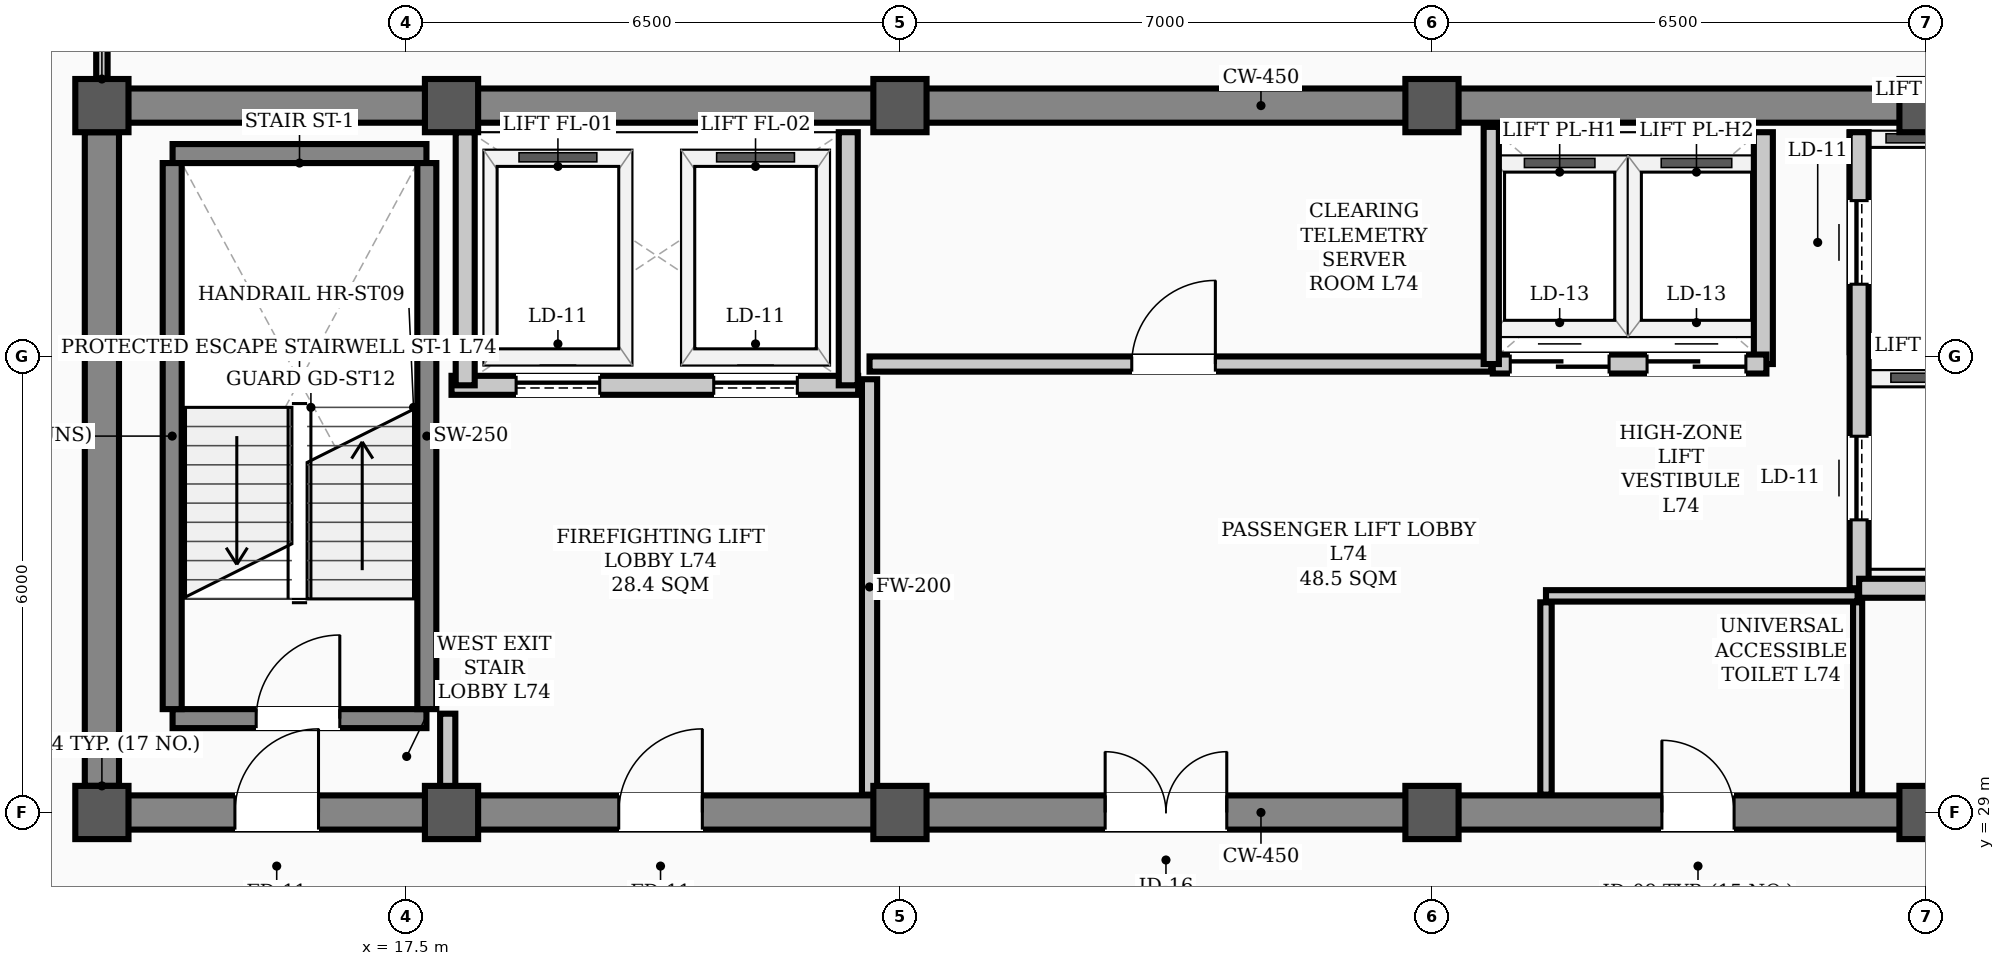
"""IFC4 building model, lengths in metres.
Left out: names, types, materials, properties, quantities, classifications, styles, units other than length and angle.
Written with IfcOpenShell. Run it as: python <this file> out.ifc"""

import sys

from ifc_helpers import new_model, si_unit, direction, frame, frame_2d, origin, origin_2d, place, context, subcontext, project, spatial, rectangle, hollow_rectangle, extrude, element, fill, save


model = new_model("IFC4")
c1 = context("Model", 3, precision=1e-05, world=origin(), true_north=direction((0.0, 1.0)))
c2 = subcontext(c1, "Body", "Model", "MODEL_VIEW")
j1 = project(units=[si_unit("LENGTHUNIT", "METRE"), si_unit("PLANEANGLEUNIT", "RADIAN")], contexts=[c1])
p1 = place(None, origin())
s1 = spatial("IfcSite", under=j1, at=p1, CompositionType="ELEMENT")
p2 = place(p1, origin())
s2 = spatial("IfcBuilding", under=s1, at=p2, CompositionType="ELEMENT")
p3 = place(p2, frame((0.0, 0.0, 296.9)))
s3 = spatial("IfcBuildingStorey", under=s2, at=p3, CompositionType="ELEMENT", Elevation=296.9)
for number, where, z_axis, x_axis in (
    (1, (13.5, 29.0, 0.0), (0.0, 0.0, 1.0), (1.0, 0.0, 0.0)),
    (2, (13.5, 38.3, 0.0), (0.0, 0.0, 1.0), (1.0, 0.0, 0.0)),
    (3, (18.1, 29.0, 0.0), (0.0, 0.0, 1.0), (1.0, 0.0, 0.0)),
    (4, (18.1, 38.3, 0.0), (0.0, 0.0, 1.0), (1.0, 0.0, 0.0)),
    (5, (24.0, 29.0, 0.0), (0.0, 0.0, 1.0), (1.0, 0.0, 0.0)),
    (6, (24.0, 38.3, 0.0), (0.0, 0.0, 1.0), (1.0, 0.0, 0.0)),
    (7, (31.0, 29.0, 0.0), (0.0, 0.0, 1.0), (1.0, 0.0, 0.0)),
    (8, (31.0, 38.3, 0.0), (0.0, 0.0, 1.0), (1.0, 0.0, 0.0)),
    (9, (37.5, 29.0, 0.0), (0.0, 0.0, 1.0), (1.0, 0.0, 0.0)),
    (10, (37.5, 38.3, 0.0), (0.0, 0.0, 1.0), (1.0, 0.0, 0.0)),
):
    element("IfcColumn", number, at=place(p3, frame(where, z_axis=z_axis, x_axis=x_axis)), inside=s3, PredefinedType="COLUMN", context=c2, shape_type="SweptSolid", body=[
        extrude(hollow_rectangle(XDim=0.7, YDim=0.7, WallThickness=0.028, InnerFilletRadius=0.014, OuterFilletRadius=0.042, at=origin_2d()), origin(), (0.0, 0.0, 1.0), 3.9),
    ])
p4 = place(p3, frame((13.5, 29.0, 0.0), z_axis=(0.0, 0.0, 1.0), x_axis=(1.0, 0.0, 0.0)))
e11 = element("IfcWall", 11, at=p4, inside=s3, PredefinedType="SHEAR", context=c2, shape_type="SweptSolid", body=[
    extrude(rectangle(XDim=30.5, YDim=0.45, at=frame_2d((15.25, 0.0))), origin(), (0.0, 0.0, 1.0), 3.72),
])
p5 = place(p4, frame((1.75, 0.0, 0.0)))
e12 = element("IfcOpeningElement", 12, at=p5, cuts=e11, PredefinedType="OPENING", context=c2, shape_type="SweptSolid", body=[
    extrude(rectangle(XDim=1.1, YDim=2.08, at=frame_2d((0.55, 1.04))), frame((0.0, 0.235, 0.0), z_axis=(0.0, -1.0, 0.0), x_axis=(1.0, 0.0, 0.0)), (0.0, 0.0, 1.0), 0.47),
])
p6 = place(p4, frame((26.7, 0.0, 0.0)))
e13 = element("IfcOpeningElement", 13, at=p6, cuts=e11, PredefinedType="OPENING", context=c2, shape_type="SweptSolid", body=[
    extrude(rectangle(XDim=1.1, YDim=2.08, at=frame_2d((0.55, 1.04))), frame((0.0, 0.235, 0.0), z_axis=(0.0, -1.0, 0.0), x_axis=(1.0, 0.0, 0.0)), (0.0, 0.0, 1.0), 0.47),
])
p7 = place(p4, frame((6.8, 0.0, 0.0)))
e14 = element("IfcOpeningElement", 14, at=p7, cuts=e11, PredefinedType="OPENING", context=c2, shape_type="SweptSolid", body=[
    extrude(rectangle(XDim=1.1, YDim=2.08, at=frame_2d((0.55, 1.04))), frame((0.0, 0.235, 0.0), z_axis=(0.0, -1.0, 0.0), x_axis=(1.0, 0.0, 0.0)), (0.0, 0.0, 1.0), 0.47),
])
p8 = place(p4, frame((13.2, 0.0, 0.0)))
e15 = element("IfcOpeningElement", 15, at=p8, cuts=e11, PredefinedType="OPENING", context=c2, shape_type="SweptSolid", body=[
    extrude(rectangle(XDim=1.6, YDim=2.08, at=frame_2d((0.8, 1.04))), frame((0.0, 0.235, 0.0), z_axis=(0.0, -1.0, 0.0), x_axis=(1.0, 0.0, 0.0)), (0.0, 0.0, 1.0), 0.47),
])
p9 = place(p4, frame((20.525, 0.0, 0.0)))
e16 = element("IfcOpeningElement", 16, at=p9, cuts=e11, PredefinedType="OPENING", context=c2, shape_type="SweptSolid", body=[
    extrude(rectangle(XDim=0.95, YDim=2.08, at=frame_2d((0.475, 1.04))), frame((0.0, 0.235, 0.0), z_axis=(0.0, -1.0, 0.0), x_axis=(1.0, 0.0, 0.0)), (0.0, 0.0, 1.0), 0.47),
])
p10 = place(p3, frame((13.5, 38.3, 0.0), z_axis=(0.0, 0.0, 1.0), x_axis=(1.0, 0.0, 0.0)))
e17 = element("IfcWall", 17, at=p10, inside=s3, PredefinedType="SHEAR", context=c2, shape_type="SweptSolid", body=[
    extrude(rectangle(XDim=30.5, YDim=0.45, at=frame_2d((15.25, 0.0))), origin(), (0.0, 0.0, 1.0), 3.72),
])
p11 = place(p3, frame((13.5, 29.35, 0.0), z_axis=(0.0, 0.0, 1.0), x_axis=(0.0, 1.0, 0.0)))
e18 = element("IfcWall", 18, at=p11, inside=s3, PredefinedType="SHEAR", context=c2, shape_type="SweptSolid", body=[
    extrude(rectangle(XDim=8.6, YDim=0.45, at=frame_2d((4.3, 0.0))), origin(), (0.0, 0.0, 1.0), 3.72),
])
p12 = place(p3, frame((14.43, 30.235, 0.0), z_axis=(0.0, 0.0, 1.0), x_axis=(1.0, 0.0, 0.0)))
e19 = element("IfcWall", 19, at=p12, inside=s3, PredefinedType="STANDARD", context=c2, shape_type="SweptSolid", body=[
    extrude(rectangle(XDim=3.34, YDim=0.25, at=frame_2d((1.67, 0.0))), origin(), (0.0, 0.0, 1.0), 3.72),
])
p13 = place(p12, frame((1.1, 0.0, 0.0)))
e20 = element("IfcOpeningElement", 20, at=p13, cuts=e19, PredefinedType="OPENING", context=c2, shape_type="SweptSolid", body=[
    extrude(rectangle(XDim=1.1, YDim=2.08, at=frame_2d((0.55, 1.04))), frame((0.0, 0.135, 0.0), z_axis=(0.0, -1.0, 0.0), x_axis=(1.0, 0.0, 0.0)), (0.0, 0.0, 1.0), 0.27),
])
p14 = place(p3, frame((14.43, 37.669, 0.0), z_axis=(0.0, 0.0, 1.0), x_axis=(1.0, 0.0, 0.0)))
e21 = element("IfcWall", 21, at=p14, inside=s3, PredefinedType="STANDARD", context=c2, shape_type="SweptSolid", body=[
    extrude(rectangle(XDim=3.34, YDim=0.25, at=frame_2d((1.67, 0.0))), origin(), (0.0, 0.0, 1.0), 3.72),
])
for number, where, z_axis, x_axis in (
    (22, (14.425, 30.36, 0.0), (0.0, 0.0, 1.0), (0.0, 1.0, 0.0)),
    (23, (17.775, 30.36, 0.0), (0.0, 0.0, 1.0), (0.0, 1.0, 0.0)),
):
    element("IfcWall", number, at=place(p3, frame(where, z_axis=z_axis, x_axis=x_axis)), inside=s3, PredefinedType="STANDARD", context=c2, shape_type="SweptSolid", body=[
        extrude(rectangle(XDim=7.184, YDim=0.25, at=frame_2d((3.592, 0.0))), origin(), (0.0, 0.0, 1.0), 3.72),
    ])
p15 = place(p3, frame((18.1, 34.62, 0.0), z_axis=(0.0, 0.0, 1.0), x_axis=(1.0, 0.0, 0.0)))
e24 = element("IfcWall", 24, at=p15, inside=s3, PredefinedType="STANDARD", context=c2, shape_type="SweptSolid", body=[
    extrude(rectangle(XDim=5.35, YDim=0.25, at=frame_2d((2.675, 0.0))), origin(), (0.0, 0.0, 1.0), 3.72),
])
p16 = place(p15, frame((0.85, 0.0, 0.0)))
e25 = element("IfcOpeningElement", 25, at=p16, cuts=e24, PredefinedType="OPENING", context=c2, shape_type="SweptSolid", body=[
    extrude(rectangle(XDim=1.1, YDim=2.08, at=frame_2d((0.55, 1.04))), frame((0.0, 0.135, 0.0), z_axis=(0.0, -1.0, 0.0), x_axis=(1.0, 0.0, 0.0)), (0.0, 0.0, 1.0), 0.27),
])
p17 = place(p15, frame((3.45, 0.0, 0.0)))
e26 = element("IfcOpeningElement", 26, at=p17, cuts=e24, PredefinedType="OPENING", context=c2, shape_type="SweptSolid", body=[
    extrude(rectangle(XDim=1.1, YDim=2.08, at=frame_2d((0.55, 1.04))), frame((0.0, 0.135, 0.0), z_axis=(0.0, -1.0, 0.0), x_axis=(1.0, 0.0, 0.0)), (0.0, 0.0, 1.0), 0.27),
])
p18 = place(p3, frame((36.62, 31.95, 0.0), z_axis=(0.0, 0.0, 1.0), x_axis=(0.0, 1.0, 0.0)))
e27 = element("IfcWall", 27, at=p18, inside=s3, PredefinedType="STANDARD", context=c2, shape_type="SweptSolid", body=[
    extrude(rectangle(XDim=6.0, YDim=0.25, at=frame_2d((3.0, 0.0))), origin(), (0.0, 0.0, 1.0), 3.4),
])
p19 = place(p18, frame((0.9, 0.0, 0.0)))
e28 = element("IfcOpeningElement", 28, at=p19, cuts=e27, PredefinedType="OPENING", context=c2, shape_type="SweptSolid", body=[
    extrude(rectangle(XDim=1.1, YDim=2.08, at=frame_2d((0.55, 1.04))), frame((0.0, 0.135, 0.0), z_axis=(0.0, -1.0, 0.0), x_axis=(1.0, 0.0, 0.0)), (0.0, 0.0, 1.0), 0.27),
])
p20 = place(p18, frame((4.0, 0.0, 0.0)))
e29 = element("IfcOpeningElement", 29, at=p20, cuts=e27, PredefinedType="OPENING", context=c2, shape_type="SweptSolid", body=[
    extrude(rectangle(XDim=1.1, YDim=2.08, at=frame_2d((0.55, 1.04))), frame((0.0, 0.135, 0.0), z_axis=(0.0, -1.0, 0.0), x_axis=(1.0, 0.0, 0.0)), (0.0, 0.0, 1.0), 0.27),
])
p21 = place(p3, frame((36.62, 31.95, 0.0), z_axis=(0.0, 0.0, 1.0), x_axis=(1.0, 0.0, 0.0)))
e30 = element("IfcWall", 30, at=p21, inside=s3, PredefinedType="STANDARD", context=c2, shape_type="SweptSolid", body=[
    extrude(rectangle(XDim=1.9, YDim=0.25, at=frame_2d((0.95, 0.0))), origin(), (0.0, 0.0, 1.0), 3.48),
])
for number, where, z_axis, x_axis in (
    (31, (18.28, 34.62, 0.0), (0.0, 0.0, 1.0), (0.0, 1.0, 0.0)),
    (32, (23.32, 34.62, 0.0), (0.0, 0.0, 1.0), (0.0, 1.0, 0.0)),
):
    element("IfcWall", number, at=place(p3, frame(where, z_axis=z_axis, x_axis=x_axis)), inside=s3, PredefinedType="STANDARD", context=c2, shape_type="SweptSolid", body=[
        extrude(rectangle(XDim=3.33, YDim=0.25, at=frame_2d((1.665, 0.0))), origin(), (0.0, 0.0, 1.0), 3.72),
    ])
p22 = place(p3, frame((35.36, 34.9, 0.0), z_axis=(0.0, 0.0, 1.0), x_axis=(0.0, 1.0, 0.0)))
e33 = element("IfcWall", 33, at=p22, inside=s3, PredefinedType="STANDARD", context=c2, shape_type="SweptSolid", body=[
    extrude(rectangle(XDim=3.05, YDim=0.25, at=frame_2d((1.525, 0.0))), origin(), (0.0, 0.0, 1.0), 3.4),
])
p23 = place(p3, frame((31.8, 34.9, 0.0), z_axis=(0.0, 0.0, 1.0), x_axis=(1.0, 0.0, 0.0)))
e34 = element("IfcWall", 34, at=p23, inside=s3, PredefinedType="STANDARD", context=c2, shape_type="SweptSolid", body=[
    extrude(rectangle(XDim=3.6, YDim=0.25, at=frame_2d((1.8, 0.0))), origin(), (0.0, 0.0, 1.0), 3.72),
])
p24 = place(p23, frame((0.23, 0.0, 0.0)))
e35 = element("IfcOpeningElement", 35, at=p24, cuts=e34, PredefinedType="OPENING", context=c2, shape_type="SweptSolid", body=[
    extrude(rectangle(XDim=1.3, YDim=2.08, at=frame_2d((0.65, 1.04))), frame((0.0, 0.135, 0.0), z_axis=(0.0, -1.0, 0.0), x_axis=(1.0, 0.0, 0.0)), (0.0, 0.0, 1.0), 0.27),
])
p25 = place(p23, frame((2.03, 0.0, 0.0)))
e36 = element("IfcOpeningElement", 36, at=p25, cuts=e34, PredefinedType="OPENING", context=c2, shape_type="SweptSolid", body=[
    extrude(rectangle(XDim=1.3, YDim=2.08, at=frame_2d((0.65, 1.04))), frame((0.0, 0.135, 0.0), z_axis=(0.0, -1.0, 0.0), x_axis=(1.0, 0.0, 0.0)), (0.0, 0.0, 1.0), 0.27),
])
p26 = place(p3, frame((23.6, 34.9, 0.0), z_axis=(0.0, 0.0, 1.0), x_axis=(1.0, 0.0, 0.0)))
e37 = element("IfcWall", 37, at=p26, inside=s3, PredefinedType="STANDARD", context=c2, shape_type="SweptSolid", body=[
    extrude(rectangle(XDim=8.18, YDim=0.2, at=frame_2d((4.09, 0.0))), origin(), (0.0, 0.0, 1.0), 3.72),
])
p27 = place(p26, frame((3.45, 0.0, 0.0)))
e38 = element("IfcOpeningElement", 38, at=p27, cuts=e37, PredefinedType="OPENING", context=c2, shape_type="SweptSolid", body=[
    extrude(rectangle(XDim=1.1, YDim=2.08, at=frame_2d((0.55, 1.04))), frame((0.0, 0.11, 0.0), z_axis=(0.0, -1.0, 0.0), x_axis=(1.0, 0.0, 0.0)), (0.0, 0.0, 1.0), 0.22),
])
p28 = place(p3, frame((32.5, 31.85, 0.0), z_axis=(0.0, 0.0, 1.0), x_axis=(1.0, 0.0, 0.0)))
e39 = element("IfcWall", 39, at=p28, inside=s3, PredefinedType="PARTITIONING", context=c2, shape_type="SweptSolid", body=[
    extrude(rectangle(XDim=4.1, YDim=0.15, at=frame_2d((2.05, 0.0))), origin(), (0.0, 0.0, 1.0), 3.72),
])
p29 = place(p3, frame((18.05, 29.235, 0.0), z_axis=(0.0, 0.0, 1.0), x_axis=(0.0, 1.0, 0.0)))
e40 = element("IfcWall", 40, at=p29, inside=s3, PredefinedType="STANDARD", context=c2, shape_type="SweptSolid", body=[
    extrude(rectangle(XDim=1.065, YDim=0.2, at=frame_2d((0.532, 0.0))), origin(), (0.0, 0.0, 1.0), 3.72),
])
p30 = place(p3, frame((23.6, 29.235, 0.0), z_axis=(0.0, 0.0, 1.0), x_axis=(0.0, 1.0, 0.0)))
e41 = element("IfcWall", 41, at=p30, inside=s3, PredefinedType="STANDARD", context=c2, shape_type="SweptSolid", body=[
    extrude(rectangle(XDim=5.465, YDim=0.2, at=frame_2d((2.732, 0.0))), origin(), (0.0, 0.0, 1.0), 3.2),
])
p31 = place(p3, frame((32.5, 29.235, 0.0), z_axis=(0.0, 0.0, 1.0), x_axis=(0.0, 1.0, 0.0)))
e42 = element("IfcWall", 42, at=p31, inside=s3, PredefinedType="PARTITIONING", context=c2, shape_type="SweptSolid", body=[
    extrude(rectangle(XDim=2.53, YDim=0.15, at=frame_2d((1.265, 0.0))), origin(), (0.0, 0.0, 1.0), 3.4),
])
p32 = place(p3, frame((36.6, 29.235, 0.0), z_axis=(0.0, 0.0, 1.0), x_axis=(0.0, 1.0, 0.0)))
e43 = element("IfcWall", 43, at=p32, inside=s3, PredefinedType="PARTITIONING", context=c2, shape_type="SweptSolid", body=[
    extrude(rectangle(XDim=2.53, YDim=0.12, at=frame_2d((1.265, 0.0))), origin(), (0.0, 0.0, 1.0), 3.4),
])
p33 = place(p3, frame((13.5, 38.535, 0.0), z_axis=(0.0, 0.0, 1.0), x_axis=(0.0, 1.0, 0.0)))
e44 = element("IfcWall", 44, at=p33, inside=s3, PredefinedType="PARTITIONING", context=c2, shape_type="SweptSolid", body=[
    extrude(rectangle(XDim=2.405, YDim=0.15, at=frame_2d((1.203, 0.0))), origin(), (0.0, 0.0, 1.0), 3.72),
])
p34 = place(p3, frame((31.78, 34.9, 0.0), z_axis=(0.0, 0.0, 1.0), x_axis=(0.0, 1.0, 0.0)))
e45 = element("IfcWall", 45, at=p34, inside=s3, PredefinedType="STANDARD", context=c2, shape_type="SweptSolid", body=[
    extrude(rectangle(XDim=3.12, YDim=0.2, at=frame_2d((1.56, 0.0))), origin(), (0.0, 0.0, 1.0), 3.4),
])
p35 = place(p13, origin())
e46 = element("IfcDoor", 46, at=p35, inside=s3, OperationType="SINGLE_SWING_RIGHT", PredefinedType="DOOR", context=c2, shape_type="SweptSolid", body=[
    extrude(rectangle(XDim=1.1, YDim=2.08, at=frame_2d((0.55, 1.04))), frame((0.0, 0.025, 0.0), z_axis=(0.0, -1.0, 0.0), x_axis=(1.0, 0.0, 0.0)), (0.0, 0.0, 1.0), 0.05),
])
fill(e20, e46)
p36 = place(p5, origin())
e47 = element("IfcDoor", 47, at=p36, inside=s3, OperationType="SINGLE_SWING_RIGHT", PredefinedType="DOOR", context=c2, shape_type="SweptSolid", body=[
    extrude(rectangle(XDim=1.1, YDim=2.08, at=frame_2d((0.55, 1.04))), frame((0.0, 0.025, 0.0), z_axis=(0.0, -1.0, 0.0), x_axis=(1.0, 0.0, 0.0)), (0.0, 0.0, 1.0), 0.05),
])
fill(e12, e47)
p37 = place(p7, origin())
e48 = element("IfcDoor", 48, at=p37, inside=s3, OperationType="SINGLE_SWING_RIGHT", PredefinedType="DOOR", context=c2, shape_type="SweptSolid", body=[
    extrude(rectangle(XDim=1.1, YDim=2.08, at=frame_2d((0.55, 1.04))), frame((0.0, 0.025, 0.0), z_axis=(0.0, -1.0, 0.0), x_axis=(1.0, 0.0, 0.0)), (0.0, 0.0, 1.0), 0.05),
])
fill(e14, e48)
p38 = place(p8, origin())
e49 = element("IfcDoor", 49, at=p38, inside=s3, OperationType="DOUBLE_DOOR_SINGLE_SWING", PredefinedType="DOOR", context=c2, shape_type="SweptSolid", body=[
    extrude(rectangle(XDim=1.6, YDim=2.08, at=frame_2d((0.8, 1.04))), frame((0.0, 0.025, 0.0), z_axis=(0.0, -1.0, 0.0), x_axis=(1.0, 0.0, 0.0)), (0.0, 0.0, 1.0), 0.05),
])
fill(e15, e49)
p39 = place(p27, origin())
e50 = element("IfcDoor", 50, at=p39, inside=s3, OperationType="SINGLE_SWING_RIGHT", PredefinedType="DOOR", context=c2, shape_type="SweptSolid", body=[
    extrude(rectangle(XDim=1.1, YDim=2.08, at=frame_2d((0.55, 1.04))), frame((0.0, 0.025, 0.0), z_axis=(0.0, -1.0, 0.0), x_axis=(1.0, 0.0, 0.0)), (0.0, 0.0, 1.0), 0.05),
])
fill(e38, e50)
p40 = place(p9, origin())
e51 = element("IfcDoor", 51, at=p40, inside=s3, OperationType="SINGLE_SWING_LEFT", PredefinedType="DOOR", context=c2, shape_type="SweptSolid", body=[
    extrude(rectangle(XDim=0.95, YDim=2.08, at=frame_2d((0.475, 1.04))), frame((0.0, 0.025, 0.0), z_axis=(0.0, -1.0, 0.0), x_axis=(1.0, 0.0, 0.0)), (0.0, 0.0, 1.0), 0.05),
])
fill(e16, e51)
p41 = place(p16, origin())
e52 = element("IfcDoor", 52, at=p41, inside=s3, OperationType="SLIDING_TO_LEFT", PredefinedType="DOOR", context=c2, shape_type="SweptSolid", body=[
    extrude(rectangle(XDim=1.1, YDim=2.08, at=frame_2d((0.55, 1.04))), frame((0.0, 0.025, 0.0), z_axis=(0.0, -1.0, 0.0), x_axis=(1.0, 0.0, 0.0)), (0.0, 0.0, 1.0), 0.05),
])
fill(e25, e52)
p42 = place(p17, origin())
e53 = element("IfcDoor", 53, at=p42, inside=s3, OperationType="SLIDING_TO_LEFT", PredefinedType="DOOR", context=c2, shape_type="SweptSolid", body=[
    extrude(rectangle(XDim=1.1, YDim=2.08, at=frame_2d((0.55, 1.04))), frame((0.0, 0.025, 0.0), z_axis=(0.0, -1.0, 0.0), x_axis=(1.0, 0.0, 0.0)), (0.0, 0.0, 1.0), 0.05),
])
fill(e26, e53)
p43 = place(p19, origin())
e54 = element("IfcDoor", 54, at=p43, inside=s3, OperationType="SLIDING_TO_LEFT", PredefinedType="DOOR", context=c2, shape_type="SweptSolid", body=[
    extrude(rectangle(XDim=1.1, YDim=2.08, at=frame_2d((0.55, 1.04))), frame((0.0, 0.025, 0.0), z_axis=(0.0, -1.0, 0.0), x_axis=(1.0, 0.0, 0.0)), (0.0, 0.0, 1.0), 0.05),
])
fill(e28, e54)
p44 = place(p20, origin())
e55 = element("IfcDoor", 55, at=p44, inside=s3, OperationType="SLIDING_TO_LEFT", PredefinedType="DOOR", context=c2, shape_type="SweptSolid", body=[
    extrude(rectangle(XDim=1.1, YDim=2.08, at=frame_2d((0.55, 1.04))), frame((0.0, 0.025, 0.0), z_axis=(0.0, -1.0, 0.0), x_axis=(1.0, 0.0, 0.0)), (0.0, 0.0, 1.0), 0.05),
])
fill(e29, e55)
p45 = place(p24, origin())
e56 = element("IfcDoor", 56, at=p45, inside=s3, OperationType="DOUBLE_DOOR_SLIDING", PredefinedType="DOOR", context=c2, shape_type="SweptSolid", body=[
    extrude(rectangle(XDim=1.3, YDim=2.08, at=frame_2d((0.65, 1.04))), frame((0.0, 0.025, 0.0), z_axis=(0.0, -1.0, 0.0), x_axis=(1.0, 0.0, 0.0)), (0.0, 0.0, 1.0), 0.05),
])
fill(e35, e56)
p46 = place(p25, origin())
e57 = element("IfcDoor", 57, at=p46, inside=s3, OperationType="DOUBLE_DOOR_SLIDING", PredefinedType="DOOR", context=c2, shape_type="SweptSolid", body=[
    extrude(rectangle(XDim=1.3, YDim=2.08, at=frame_2d((0.65, 1.04))), frame((0.0, 0.025, 0.0), z_axis=(0.0, -1.0, 0.0), x_axis=(1.0, 0.0, 0.0)), (0.0, 0.0, 1.0), 0.05),
])
fill(e36, e57)
save(model, sys.argv[1])
